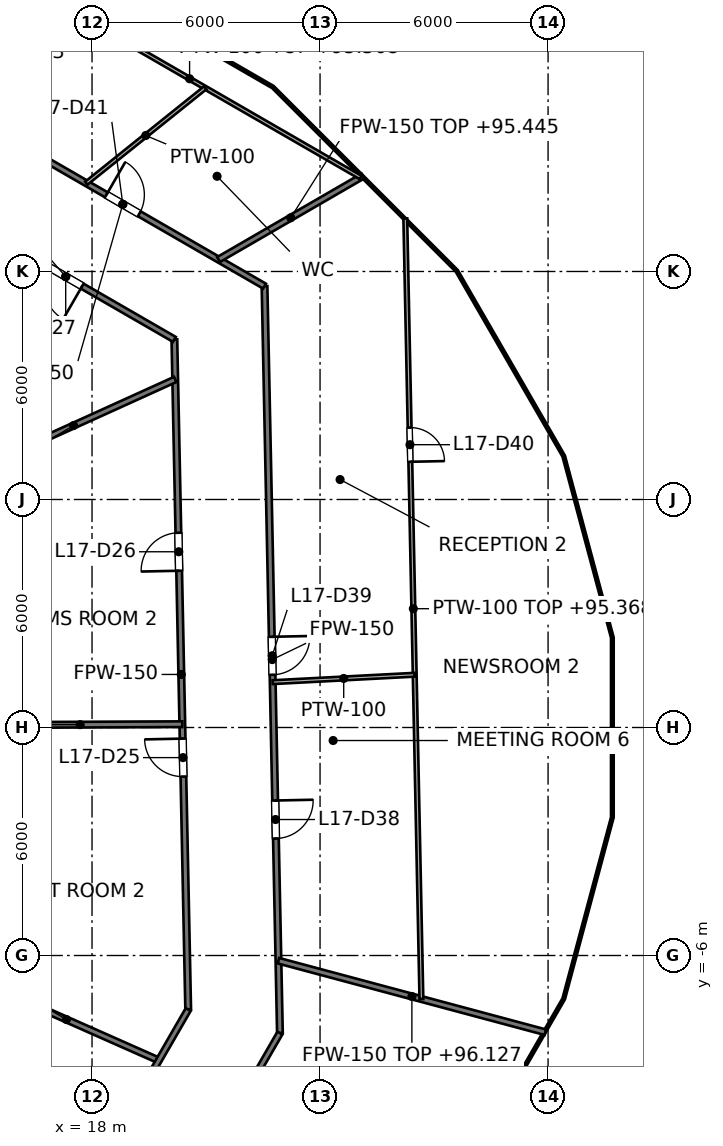
"""IFC4 building model, lengths in metres.
Left out: names, types, materials, properties, quantities, classifications, styles, units other than length and angle.
Written with IfcOpenShell. Run it as: python <this file> out.ifc"""

import sys

from ifc_helpers import new_model, si_unit, direction, frame, frame_2d, origin, place, context, subcontext, project, spatial, rectangle, extrude, element, fill, save


model = new_model("IFC4")
c1 = context("Model", 3, precision=1e-05, world=origin(), true_north=direction((0.0, 1.0)))
c2 = subcontext(c1, "Body", "Model", "MODEL_VIEW")
j1 = project(units=[si_unit("LENGTHUNIT", "METRE"), si_unit("PLANEANGLEUNIT", "RADIAN")], contexts=[c1])
p1 = place(None, origin())
s1 = spatial("IfcSite", under=j1, at=p1, CompositionType="ELEMENT")
p2 = place(p1, origin())
s2 = spatial("IfcBuilding", under=s1, at=p2, CompositionType="ELEMENT")
p3 = place(p2, frame((0.0, 0.0, 92.4)))
s3 = spatial("IfcBuildingStorey", under=s2, at=p3, CompositionType="ELEMENT", Elevation=92.4)
p4 = place(p3, frame((20.167, 10.213, 0.0), z_axis=(0.0, 0.0, 1.0), x_axis=(0.020610894613, -0.999787572949, 0.0)))
e1 = element("IfcWall", 1, at=p4, inside=s3, PredefinedType="PARTITIONING", context=c2, shape_type="SweptSolid", body=[
    extrude(rectangle(XDim=17.637, YDim=0.15, at=frame_2d((8.819, 0.0))), origin(), (0.0, 0.0, 1.0), 2.968),
])
p5 = place(p4, frame((10.508, 0.0, 0.0)))
e2 = element("IfcOpeningElement", 2, at=p5, cuts=e1, PredefinedType="OPENING", context=c2, shape_type="SweptSolid", body=[
    extrude(rectangle(XDim=1.0, YDim=2.1, at=frame_2d((0.5, 1.05))), frame((0.0, 0.075, 0.0), z_axis=(0.0, -1.0, 0.0), x_axis=(1.0, 0.0, 0.0)), (0.0, 0.0, 1.0), 0.15),
])
p6 = place(p4, frame((5.09, 0.0, 0.0)))
e3 = element("IfcOpeningElement", 3, at=p6, cuts=e1, PredefinedType="OPENING", context=c2, shape_type="SweptSolid", body=[
    extrude(rectangle(XDim=1.0, YDim=2.1, at=frame_2d((0.5, 1.05))), frame((0.0, 0.075, 0.0), z_axis=(0.0, -1.0, 0.0), x_axis=(1.0, 0.0, 0.0)), (0.0, 0.0, 1.0), 0.15),
])
p7 = place(p3, frame((22.539, 11.615, 0.0), z_axis=(0.0, 0.0, 1.0), x_axis=(0.020601506683, -0.99978776644, 0.0)))
e4 = element("IfcWall", 4, at=p7, inside=s3, PredefinedType="PARTITIONING", context=c2, shape_type="SweptSolid", body=[
    extrude(rectangle(XDim=19.66, YDim=0.15, at=frame_2d((9.83, 0.0))), origin(), (0.0, 0.0, 1.0), 2.968),
])
p8 = place(p7, frame((13.54, 0.0, 0.0)))
e5 = element("IfcOpeningElement", 5, at=p8, cuts=e4, PredefinedType="OPENING", context=c2, shape_type="SweptSolid", body=[
    extrude(rectangle(XDim=1.0, YDim=2.1, at=frame_2d((0.5, 1.05))), frame((0.0, 0.075, 0.0), z_axis=(0.0, -1.0, 0.0), x_axis=(1.0, 0.0, 0.0)), (0.0, 0.0, 1.0), 0.15),
])
p9 = place(p7, frame((9.23, 0.0, 0.0)))
e6 = element("IfcOpeningElement", 6, at=p9, cuts=e4, PredefinedType="OPENING", context=c2, shape_type="SweptSolid", body=[
    extrude(rectangle(XDim=1.0, YDim=2.1, at=frame_2d((0.5, 1.05))), frame((0.0, 0.075, 0.0), z_axis=(0.0, -1.0, 0.0), x_axis=(1.0, 0.0, 0.0)), (0.0, 0.0, 1.0), 0.15),
])
p10 = place(p3, frame((14.448, 13.515, 0.0), z_axis=(0.0, 0.0, 1.0), x_axis=(0.866032288321, -0.499988075443, 0.0)))
e7 = element("IfcWall", 7, at=p10, inside=s3, PredefinedType="PARTITIONING", context=c2, shape_type="SweptSolid", body=[
    extrude(rectangle(XDim=6.604, YDim=0.15, at=frame_2d((3.302, 0.0))), origin(), (0.0, 0.0, 1.0), 2.968),
])
p11 = place(p10, frame((2.802, 0.0, 0.0)))
e8 = element("IfcOpeningElement", 8, at=p11, cuts=e7, PredefinedType="OPENING", context=c2, shape_type="SweptSolid", body=[
    extrude(rectangle(XDim=1.0, YDim=2.1, at=frame_2d((0.5, 1.05))), frame((0.0, 0.075, 0.0), z_axis=(0.0, -1.0, 0.0), x_axis=(1.0, 0.0, 0.0)), (0.0, 0.0, 1.0), 0.15),
])
p12 = place(p3, frame((15.08, 15.921, 0.0), z_axis=(0.0, 0.0, 1.0), x_axis=(0.866020838546, -0.500007907142, 0.0)))
e9 = element("IfcWall", 9, at=p12, inside=s3, PredefinedType="PARTITIONING", context=c2, shape_type="SweptSolid", body=[
    extrude(rectangle(XDim=8.613, YDim=0.15, at=frame_2d((4.306, 0.0))), origin(), (0.0, 0.0, 1.0), 2.968),
])
p13 = place(p12, frame((3.807, 0.0, 0.0)))
e10 = element("IfcOpeningElement", 10, at=p13, cuts=e9, PredefinedType="OPENING", context=c2, shape_type="SweptSolid", body=[
    extrude(rectangle(XDim=1.0, YDim=2.1, at=frame_2d((0.5, 1.05))), frame((0.0, 0.075, 0.0), z_axis=(0.0, -1.0, 0.0), x_axis=(1.0, 0.0, 0.0)), (0.0, 0.0, 1.0), 0.15),
])
p14 = place(p3, frame((14.895, -6.607, 0.0), z_axis=(0.0, 0.0, 1.0), x_axis=(0.914233271379, -0.405188259337, 0.0)))
e11 = element("IfcWall", 11, at=p14, inside=s3, PredefinedType="PARTITIONING", context=c2, shape_type="SweptSolid", body=[
    extrude(rectangle(XDim=5.317, YDim=0.15, at=frame_2d((2.659, 0.0))), origin(), (0.0, 0.0, 1.0), 2.977),
])
p15 = place(p3, frame((22.905, -6.137, 0.0), z_axis=(0.0, 0.0, 1.0), x_axis=(0.965915974273, -0.258855810529, 0.0)))
e12 = element("IfcWall", 12, at=p15, inside=s3, PredefinedType="PARTITIONING", context=c2, shape_type="SweptSolid", body=[
    extrude(rectangle(XDim=7.271, YDim=0.15, at=frame_2d((3.635, 0.0))), origin(), (0.0, 0.0, 1.0), 3.727),
])
p16 = place(p3, frame((15.0, 0.063, 0.0), z_axis=(0.0, 0.0, 1.0), x_axis=(0.999990294223, 0.004405843865, 0.0)))
e13 = element("IfcWall", 13, at=p16, inside=s3, PredefinedType="PARTITIONING", context=c2, shape_type="SweptSolid", body=[
    extrude(rectangle(XDim=5.375, YDim=0.15, at=frame_2d((2.688, 0.0))), origin(), (0.0, 0.0, 1.0), 2.968),
])
p17 = place(p3, frame((14.843, 6.733, 0.0), z_axis=(0.0, 0.0, 1.0), x_axis=(0.910628361306, 0.413226315214, 0.0)))
e14 = element("IfcWall", 14, at=p17, inside=s3, PredefinedType="PARTITIONING", context=c2, shape_type="SweptSolid", body=[
    extrude(rectangle(XDim=5.87, YDim=0.15, at=frame_2d((2.935, 0.0))), origin(), (0.0, 0.0, 1.0), 3.9),
])
p18 = place(p3, frame((21.329, 12.314, 0.0), z_axis=(0.0, 0.0, 1.0), x_axis=(0.865416132284, 0.501053807472, 0.0)))
e15 = element("IfcWall", 15, at=p18, inside=s3, PredefinedType="PARTITIONING", context=c2, shape_type="SweptSolid", body=[
    extrude(rectangle(XDim=4.39, YDim=0.15, at=frame_2d((2.195, 0.0))), origin(), (0.0, 0.0, 1.0), 3.045),
])
p19 = place(p3, frame((18.587, -15.587, 0.0), z_axis=(0.0, 0.0, 1.0), x_axis=(0.500026433136, 0.866010142069, 0.0)))
e16 = element("IfcWall", 16, at=p19, inside=s3, PredefinedType="PARTITIONING", context=c2, shape_type="SweptSolid", body=[
    extrude(rectangle(XDim=8.713, YDim=0.15, at=frame_2d((4.357, 0.0))), origin(), (0.0, 0.0, 1.0), 2.968),
])
p20 = place(p19, frame((3.807, 0.0, 0.0)))
e17 = element("IfcOpeningElement", 17, at=p20, cuts=e16, PredefinedType="OPENING", context=c2, shape_type="SweptSolid", body=[
    extrude(rectangle(XDim=1.0, YDim=2.1, at=frame_2d((0.5, 1.05))), frame((0.0, 0.075, 0.0), z_axis=(0.0, -1.0, 0.0), x_axis=(1.0, 0.0, 0.0)), (0.0, 0.0, 1.0), 0.15),
])
p21 = place(p3, frame((17.194, -13.201, 0.0), z_axis=(0.0, 0.0, 1.0), x_axis=(0.50001062018, 0.866019272134, 0.0)))
e18 = element("IfcWall", 18, at=p21, inside=s3, PredefinedType="PARTITIONING", context=c2, shape_type="SweptSolid", body=[
    extrude(rectangle(XDim=6.674, YDim=0.15, at=frame_2d((3.337, 0.0))), origin(), (0.0, 0.0, 1.0), 2.968),
])
p22 = place(p21, frame((2.833, 0.0, 0.0)))
e19 = element("IfcOpeningElement", 19, at=p22, cuts=e18, PredefinedType="OPENING", context=c2, shape_type="SweptSolid", body=[
    extrude(rectangle(XDim=1.0, YDim=2.1, at=frame_2d((0.5, 1.05))), frame((0.0, 0.075, 0.0), z_axis=(0.0, -1.0, 0.0), x_axis=(1.0, 0.0, 0.0)), (0.0, 0.0, 1.0), 0.15),
])
p23 = place(p3, frame((26.243, 13.397, 0.0), z_axis=(0.0, 0.0, 1.0), x_axis=(0.020639766813, -0.999786977324, 0.0)))
e20 = element("IfcWall", 20, at=p23, inside=s3, PredefinedType="PARTITIONING", context=c2, shape_type="SweptSolid", body=[
    extrude(rectangle(XDim=20.546, YDim=0.1, at=frame_2d((10.273, 0.0))), origin(), (0.0, 0.0, 1.0), 2.968),
])
p24 = place(p23, frame((5.506, 0.0, 0.0)))
e21 = element("IfcOpeningElement", 21, at=p24, cuts=e20, PredefinedType="OPENING", context=c2, shape_type="SweptSolid", body=[
    extrude(rectangle(XDim=0.9, YDim=2.1, at=frame_2d((0.45, 1.05))), frame((0.0, 0.05, 0.0), z_axis=(0.0, -1.0, 0.0), x_axis=(1.0, 0.0, 0.0)), (0.0, 0.0, 1.0), 0.1),
])
p25 = place(p3, frame((16.065, 19.671, 0.0), z_axis=(0.0, 0.0, 1.0), x_axis=(0.866058502288, -0.499942667328, 0.0)))
e22 = element("IfcWall", 22, at=p25, inside=s3, PredefinedType="PARTITIONING", context=c2, shape_type="SweptSolid", body=[
    extrude(rectangle(XDim=10.397, YDim=0.1, at=frame_2d((5.198, 0.0))), origin(), (0.0, 0.0, 1.0), 2.968),
])
p26 = place(p3, frame((22.754, 1.193, 0.0), z_axis=(0.0, 0.0, 1.0), x_axis=(0.998643838338, 0.05206231025, 0.0)))
e23 = element("IfcWall", 23, at=p26, inside=s3, PredefinedType="PARTITIONING", context=c2, shape_type="SweptSolid", body=[
    extrude(rectangle(XDim=3.742, YDim=0.1, at=frame_2d((1.871, 0.0))), origin(), (0.0, 0.0, 1.0), 3.9),
])
p27 = place(p3, frame((17.849, 14.323, 0.0), z_axis=(0.0, 0.0, 1.0), x_axis=(0.7800073623, 0.625770337071, 0.0)))
e24 = element("IfcWall", 24, at=p27, inside=s3, PredefinedType="PARTITIONING", context=c2, shape_type="SweptSolid", body=[
    extrude(rectangle(XDim=4.013, YDim=0.1, at=frame_2d((2.006, 0.0))), origin(), (0.0, 0.0, 1.0), 3.9),
])
p28 = place(p5, origin())
e25 = element("IfcDoor", 25, at=p28, inside=s3, OperationType="SINGLE_SWING_LEFT", PredefinedType="DOOR", context=c2, shape_type="SweptSolid", body=[
    extrude(rectangle(XDim=1.0, YDim=2.1, at=frame_2d((0.5, 1.05))), frame((0.0, 0.025, 0.0), z_axis=(0.0, -1.0, 0.0), x_axis=(1.0, 0.0, 0.0)), (0.0, 0.0, 1.0), 0.05),
])
fill(e2, e25)
p29 = place(p6, origin())
e26 = element("IfcDoor", 26, at=p29, inside=s3, OperationType="SINGLE_SWING_RIGHT", PredefinedType="DOOR", context=c2, shape_type="SweptSolid", body=[
    extrude(rectangle(XDim=1.0, YDim=2.1, at=frame_2d((0.5, 1.05))), frame((0.0, 0.025, 0.0), z_axis=(0.0, -1.0, 0.0), x_axis=(1.0, 0.0, 0.0)), (0.0, 0.0, 1.0), 0.05),
])
fill(e3, e26)
p30 = place(p11, origin())
e27 = element("IfcDoor", 27, at=p30, inside=s3, OperationType="SINGLE_SWING_RIGHT", PredefinedType="DOOR", context=c2, shape_type="SweptSolid", body=[
    extrude(rectangle(XDim=1.0, YDim=2.1, at=frame_2d((0.5, 1.05))), frame((0.0, 0.025, 0.0), z_axis=(0.0, -1.0, 0.0), x_axis=(1.0, 0.0, 0.0)), (0.0, 0.0, 1.0), 0.05),
])
fill(e8, e27)
p31 = place(p8, origin())
e28 = element("IfcDoor", 28, at=p31, inside=s3, OperationType="SINGLE_SWING_LEFT", PredefinedType="DOOR", context=c2, shape_type="SweptSolid", body=[
    extrude(rectangle(XDim=1.0, YDim=2.1, at=frame_2d((0.5, 1.05))), frame((0.0, 0.025, 0.0), z_axis=(0.0, -1.0, 0.0), x_axis=(1.0, 0.0, 0.0)), (0.0, 0.0, 1.0), 0.05),
])
fill(e5, e28)
p32 = place(p9, origin())
e29 = element("IfcDoor", 29, at=p32, inside=s3, OperationType="SINGLE_SWING_LEFT", PredefinedType="DOOR", context=c2, shape_type="SweptSolid", body=[
    extrude(rectangle(XDim=1.0, YDim=2.1, at=frame_2d((0.5, 1.05))), frame((0.0, 0.025, 0.0), z_axis=(0.0, -1.0, 0.0), x_axis=(1.0, 0.0, 0.0)), (0.0, 0.0, 1.0), 0.05),
])
fill(e6, e29)
p33 = place(p24, origin())
e30 = element("IfcDoor", 30, at=p33, inside=s3, OperationType="SINGLE_SWING_RIGHT", PredefinedType="DOOR", context=c2, shape_type="SweptSolid", body=[
    extrude(rectangle(XDim=0.9, YDim=2.1, at=frame_2d((0.45, 1.05))), frame((0.0, 0.025, 0.0), z_axis=(0.0, -1.0, 0.0), x_axis=(1.0, 0.0, 0.0)), (0.0, 0.0, 1.0), 0.05),
])
fill(e21, e30)
p34 = place(p13, origin())
e31 = element("IfcDoor", 31, at=p34, inside=s3, OperationType="SINGLE_SWING_LEFT", PredefinedType="DOOR", context=c2, shape_type="SweptSolid", body=[
    extrude(rectangle(XDim=1.0, YDim=2.1, at=frame_2d((0.5, 1.05))), frame((0.0, 0.025, 0.0), z_axis=(0.0, -1.0, 0.0), x_axis=(1.0, 0.0, 0.0)), (0.0, 0.0, 1.0), 0.05),
])
fill(e10, e31)
save(model, sys.argv[1])
